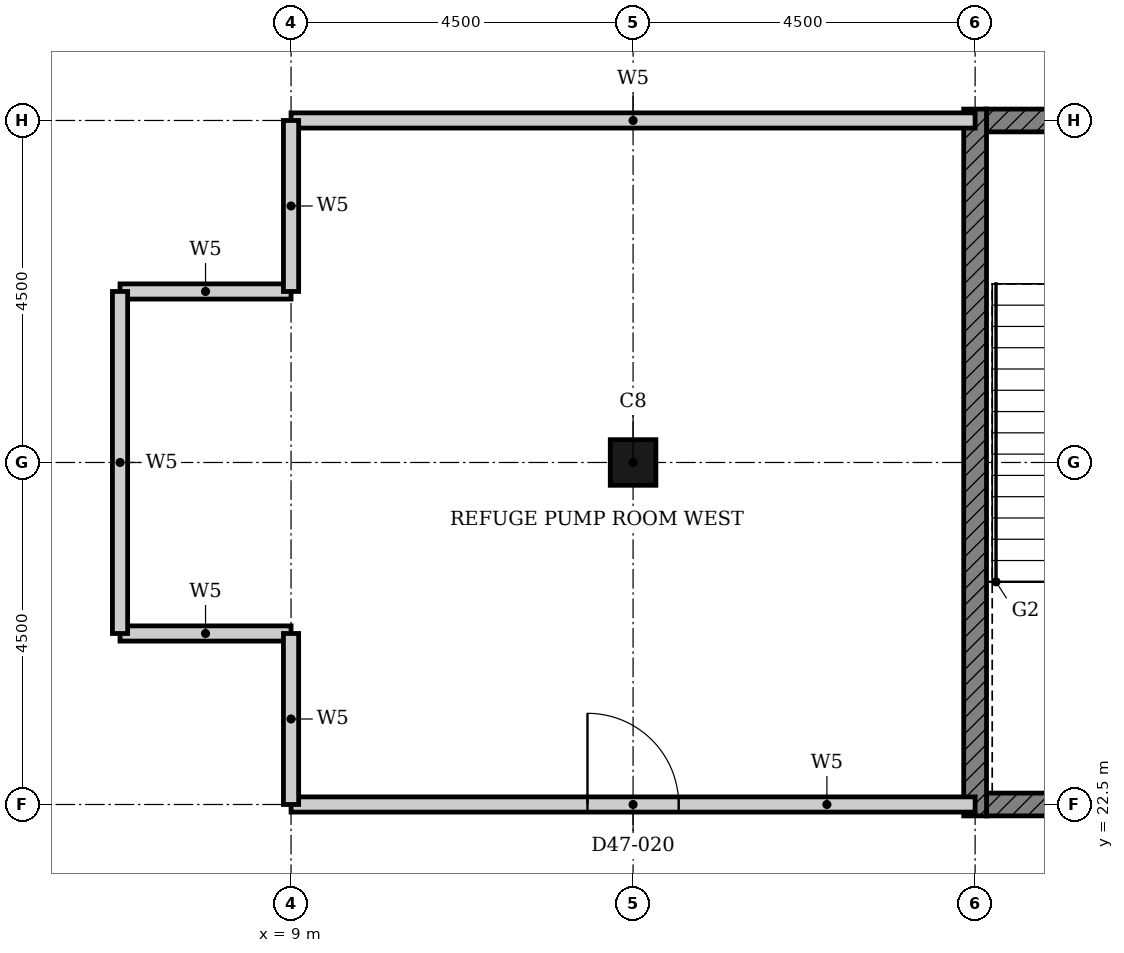
"""IFC4 building model, lengths in metres.
Left out: names, types, materials, properties, quantities, classifications, styles, units other than length and angle.
Written with IfcOpenShell. Run it as: python <this file> out.ifc"""

import sys

from ifc_helpers import new_model, si_unit, direction, frame, frame_2d, origin, origin_2d, place, context, subcontext, project, spatial, rectangle, hollow_rectangle, extrude, element, fill, save


model = new_model("IFC4")
c1 = context("Model", 3, precision=1e-05, world=origin(), true_north=direction((0.0, 1.0)))
c2 = subcontext(c1, "Body", "Model", "MODEL_VIEW")
j1 = project(units=[si_unit("LENGTHUNIT", "METRE"), si_unit("PLANEANGLEUNIT", "RADIAN")], contexts=[c1])
p1 = place(None, origin())
s1 = spatial("IfcSite", under=j1, at=p1, CompositionType="ELEMENT")
p2 = place(p1, origin())
s2 = spatial("IfcBuilding", under=s1, at=p2, CompositionType="ELEMENT")
p3 = place(p2, frame((0.0, 0.0, 187.6)))
s3 = spatial("IfcBuildingStorey", under=s2, at=p3, CompositionType="ELEMENT", Elevation=187.6)
p4 = place(p3, frame((13.5, 27.0, 0.0), z_axis=(0.0, 0.0, 1.0), x_axis=(1.0, 0.0, 0.0)))
e1 = element("IfcColumn", 1, at=p4, inside=s3, PredefinedType="COLUMN", context=c2, shape_type="SweptSolid", body=[
    extrude(hollow_rectangle(XDim=0.6, YDim=0.6, WallThickness=0.02, at=origin_2d()), origin(), (0.0, 0.0, 1.0), 4.8),
])
p5 = place(p3, frame((18.15, 22.5, 0.0), z_axis=(0.0, 0.0, 1.0), x_axis=(1.0, 0.0, 0.0)))
e2 = element("IfcWall", 2, at=p5, inside=s3, PredefinedType="SHEAR", context=c2, shape_type="SweptSolid", body=[
    extrude(rectangle(XDim=4.225, YDim=0.3, at=frame_2d((2.113, 0.0))), origin(), (0.0, 0.0, 1.0), 4.5),
])
p6 = place(p3, frame((18.15, 31.5, 0.0), z_axis=(0.0, 0.0, 1.0), x_axis=(1.0, 0.0, 0.0)))
e3 = element("IfcWall", 3, at=p6, inside=s3, PredefinedType="SHEAR", context=c2, shape_type="SweptSolid", body=[
    extrude(rectangle(XDim=9.368, YDim=0.3, at=frame_2d((4.684, 0.0))), origin(), (0.0, 0.0, 1.0), 4.5),
])
p7 = place(p6, frame((4.736, 0.0, 0.0)))
e4 = element("IfcOpeningElement", 4, at=p7, cuts=e3, PredefinedType="OPENING", context=c2, shape_type="SweptSolid", body=[
    extrude(rectangle(XDim=1.8, YDim=2.1, at=frame_2d((0.9, 1.05))), frame((0.0, 0.16, 0.0), z_axis=(0.0, -1.0, 0.0), x_axis=(1.0, 0.0, 0.0)), (0.0, 0.0, 1.0), 0.32),
])
p8 = place(p3, frame((18.0, 22.35, 0.0), z_axis=(0.0, 0.0, 1.0), x_axis=(0.0, 1.0, 0.0)))
e5 = element("IfcWall", 5, at=p8, inside=s3, PredefinedType="SHEAR", context=c2, shape_type="SweptSolid", body=[
    extrude(rectangle(XDim=9.3, YDim=0.3, at=frame_2d((4.65, 0.0))), origin(), (0.0, 0.0, 1.0), 4.5),
])
p9 = place(p3, frame((9.0, 22.5, 0.0), z_axis=(0.0, 0.0, 1.0), x_axis=(1.0, 0.0, 0.0)))
e6 = element("IfcWall", 6, at=p9, inside=s3, PredefinedType="PARTITIONING", context=c2, shape_type="SweptSolid", body=[
    extrude(rectangle(XDim=9.0, YDim=0.2, at=frame_2d((4.5, 0.0))), origin(), (0.0, 0.0, 1.0), 3.78),
])
p10 = place(p9, frame((3.9, 0.0, 0.0)))
e7 = element("IfcOpeningElement", 7, at=p10, cuts=e6, PredefinedType="OPENING", context=c2, shape_type="SweptSolid", body=[
    extrude(rectangle(XDim=1.2, YDim=2.1, at=frame_2d((0.6, 1.05))), frame((0.0, 0.11, 0.0), z_axis=(0.0, -1.0, 0.0), x_axis=(1.0, 0.0, 0.0)), (0.0, 0.0, 1.0), 0.22),
])
for number, where, z_axis, x_axis in (
    (8, (6.75, 24.75, 0.0), (0.0, 0.0, 1.0), (1.0, 0.0, 0.0)),
    (9, (6.75, 29.25, 0.0), (0.0, 0.0, 1.0), (1.0, 0.0, 0.0)),
):
    element("IfcWall", number, at=place(p3, frame(where, z_axis=z_axis, x_axis=x_axis)), inside=s3, PredefinedType="PARTITIONING", context=c2, shape_type="SweptSolid", body=[
        extrude(rectangle(XDim=2.25, YDim=0.2, at=frame_2d((1.125, 0.0))), origin(), (0.0, 0.0, 1.0), 4.5),
    ])
p11 = place(p3, frame((9.0, 31.5, 0.0), z_axis=(0.0, 0.0, 1.0), x_axis=(1.0, 0.0, 0.0)))
e10 = element("IfcWall", 10, at=p11, inside=s3, PredefinedType="PARTITIONING", context=c2, shape_type="SweptSolid", body=[
    extrude(rectangle(XDim=9.0, YDim=0.2, at=frame_2d((4.5, 0.0))), origin(), (0.0, 0.0, 1.0), 3.78),
])
p12 = place(p3, frame((6.75, 24.75, 0.0), z_axis=(0.0, 0.0, 1.0), x_axis=(0.0, 1.0, 0.0)))
e11 = element("IfcWall", 11, at=p12, inside=s3, PredefinedType="PARTITIONING", context=c2, shape_type="SweptSolid", body=[
    extrude(rectangle(XDim=4.5, YDim=0.2, at=frame_2d((2.25, 0.0))), origin(), (0.0, 0.0, 1.0), 4.5),
])
for number, where, z_axis, x_axis in (
    (12, (9.0, 22.5, 0.0), (0.0, 0.0, 1.0), (0.0, 1.0, 0.0)),
    (13, (9.0, 29.25, 0.0), (0.0, 0.0, 1.0), (0.0, 1.0, 0.0)),
):
    element("IfcWall", number, at=place(p3, frame(where, z_axis=z_axis, x_axis=x_axis)), inside=s3, PredefinedType="PARTITIONING", context=c2, shape_type="SweptSolid", body=[
        extrude(rectangle(XDim=2.25, YDim=0.2, at=frame_2d((1.125, 0.0))), origin(), (0.0, 0.0, 1.0), 4.5),
    ])
p13 = place(p10, origin())
e14 = element("IfcDoor", 14, at=p13, inside=s3, OperationType="SINGLE_SWING_RIGHT", PredefinedType="DOOR", context=c2, shape_type="SweptSolid", body=[
    extrude(rectangle(XDim=1.2, YDim=2.1, at=frame_2d((0.6, 1.05))), frame((0.0, 0.025, 0.0), z_axis=(0.0, -1.0, 0.0), x_axis=(1.0, 0.0, 0.0)), (0.0, 0.0, 1.0), 0.05),
])
fill(e7, e14)
save(model, sys.argv[1])
